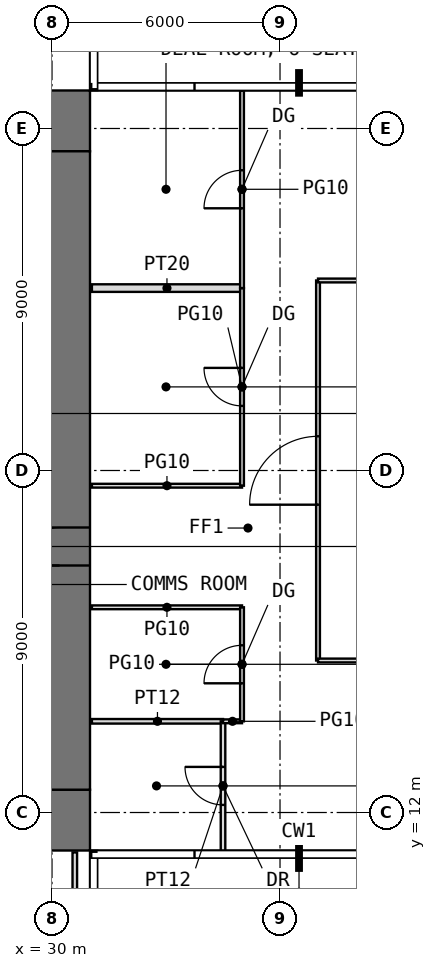
"""IFC4 building model, lengths in metres.
Left out: names, types, materials, properties, quantities, classifications, styles, units other than length and angle.
Written with IfcOpenShell. Run it as: python <this file> out.ifc"""

import sys

from ifc_helpers import new_model, si_unit, direction, frame, frame_2d, origin, place, context, subcontext, project, spatial, rectangle, extrude, element, fill, save


model = new_model("IFC4")
c1 = context("Model", 3, precision=1e-05, world=origin(), true_north=direction((0.0, 1.0)))
c2 = subcontext(c1, "Body", "Model", "MODEL_VIEW")
j1 = project(units=[si_unit("LENGTHUNIT", "METRE"), si_unit("PLANEANGLEUNIT", "RADIAN")], contexts=[c1])
p1 = place(None, origin())
s1 = spatial("IfcSite", under=j1, at=p1, CompositionType="ELEMENT")
p2 = place(p1, origin())
s2 = spatial("IfcBuilding", under=s1, at=p2, CompositionType="ELEMENT")
p3 = place(p2, frame((0.0, 0.0, 120.5)))
s3 = spatial("IfcBuildingStorey", under=s2, at=p3, CompositionType="ELEMENT", Elevation=120.5)
p4 = place(p3, frame((11.0, 11.8, -0.05), z_axis=(0.0, 0.0, 1.0), x_axis=(1.0, 0.0, 0.0)))
e1 = element("IfcWall", 1, at=p4, inside=s3, PredefinedType="SHEAR", context=c2, shape_type="SweptSolid", body=[
    extrude(rectangle(XDim=20.0, YDim=1.6, at=frame_2d((10.0, 0.0))), origin(), (0.0, 0.0, 1.0), 4.0),
])
p5 = place(p4, frame((9.0, 0.0, 0.05)))
e2 = element("IfcOpeningElement", 2, at=p5, cuts=e1, PredefinedType="OPENING", context=c2, shape_type="SweptSolid", body=[
    extrude(rectangle(XDim=2.0, YDim=2.2, at=frame_2d((1.0, 1.1))), frame((0.0, 0.81, 0.0), z_axis=(0.0, -1.0, 0.0), x_axis=(1.0, 0.0, 0.0)), (0.0, 0.0, 1.0), 1.62),
])
p6 = place(p3, frame((11.0, 30.2, -0.05), z_axis=(0.0, 0.0, 1.0), x_axis=(1.0, 0.0, 0.0)))
e3 = element("IfcWall", 3, at=p6, inside=s3, PredefinedType="SHEAR", context=c2, shape_type="SweptSolid", body=[
    extrude(rectangle(XDim=20.0, YDim=1.6, at=frame_2d((10.0, 0.0))), origin(), (0.0, 0.0, 1.0), 4.0),
])
p7 = place(p6, frame((9.0, 0.0, 0.05)))
e4 = element("IfcOpeningElement", 4, at=p7, cuts=e3, PredefinedType="OPENING", context=c2, shape_type="SweptSolid", body=[
    extrude(rectangle(XDim=2.0, YDim=2.2, at=frame_2d((1.0, 1.1))), frame((0.0, 0.81, 0.0), z_axis=(0.0, -1.0, 0.0), x_axis=(1.0, 0.0, 0.0)), (0.0, 0.0, 1.0), 1.62),
])
p8 = place(p3, frame((30.2, 12.6, -0.05), z_axis=(0.0, 0.0, 1.0), x_axis=(0.0, 1.0, 0.0)))
e5 = element("IfcWall", 5, at=p8, inside=s3, PredefinedType="SHEAR", context=c2, shape_type="SweptSolid", body=[
    extrude(rectangle(XDim=16.8, YDim=1.6, at=frame_2d((8.4, 0.0))), origin(), (0.0, 0.0, 1.0), 4.0),
])
p9 = place(p8, frame((5.9, 0.0, 0.05)))
e6 = element("IfcOpeningElement", 6, at=p9, cuts=e5, PredefinedType="OPENING", context=c2, shape_type="SweptSolid", body=[
    extrude(rectangle(XDim=1.0, YDim=2.2, at=frame_2d((0.5, 1.1))), frame((0.0, 0.81, 0.0), z_axis=(0.0, -1.0, 0.0), x_axis=(1.0, 0.0, 0.0)), (0.0, 0.0, 1.0), 1.62),
])
for number, where, z_axis, x_axis in (
    (7, (30.6, 7.5, 0.0), (0.0, 0.0, 1.0), (0.0, 1.0, 0.0)),
    (8, (31.05, 14.4, 0.0), (0.0, 0.0, 1.0), (1.0, 0.0, 0.0)),
):
    element("IfcWall", number, at=place(p3, frame(where, z_axis=z_axis, x_axis=x_axis)), inside=s3, PredefinedType="PARTITIONING", context=c2, shape_type="SweptSolid", body=[
        extrude(rectangle(XDim=3.45, YDim=0.12, at=frame_2d((1.725, 0.0))), origin(), (0.0, 0.0, 1.0), 3.75),
    ])
for number, where, z_axis, x_axis in (
    (9, (31.05, 17.4, 0.0), (0.0, 0.0, 1.0), (1.0, 0.0, 0.0)),
    (10, (31.05, 20.6, 0.0), (0.0, 0.0, 1.0), (1.0, 0.0, 0.0)),
):
    element("IfcWall", number, at=place(p3, frame(where, z_axis=z_axis, x_axis=x_axis)), inside=s3, PredefinedType="PARTITIONING", context=c2, shape_type="SweptSolid", body=[
        extrude(rectangle(XDim=3.95, YDim=0.1, at=frame_2d((1.975, 0.0))), origin(), (0.0, 0.0, 1.0), 3.75),
    ])
p10 = place(p3, frame((31.05, 25.8, 0.0), z_axis=(0.0, 0.0, 1.0), x_axis=(1.0, 0.0, 0.0)))
e11 = element("IfcWall", 11, at=p10, inside=s3, PredefinedType="PARTITIONING", context=c2, shape_type="SweptSolid", body=[
    extrude(rectangle(XDim=3.95, YDim=0.2, at=frame_2d((1.975, 0.0))), origin(), (0.0, 0.0, 1.0), 3.75),
])
p11 = place(p3, frame((34.5, 11.0, 0.0), z_axis=(0.0, 0.0, 1.0), x_axis=(0.0, 1.0, 0.0)))
e12 = element("IfcWall", 12, at=p11, inside=s3, PredefinedType="PARTITIONING", context=c2, shape_type="SweptSolid", body=[
    extrude(rectangle(XDim=3.4, YDim=0.12, at=frame_2d((1.7, 0.0))), origin(), (0.0, 0.0, 1.0), 3.75),
])
p12 = place(p11, frame((1.2, 0.0, 0.0)))
e13 = element("IfcOpeningElement", 13, at=p12, cuts=e12, PredefinedType="OPENING", context=c2, shape_type="SweptSolid", body=[
    extrude(rectangle(XDim=1.0, YDim=2.2, at=frame_2d((0.5, 1.1))), frame((0.0, 0.07, 0.0), z_axis=(0.0, -1.0, 0.0), x_axis=(1.0, 0.0, 0.0)), (0.0, 0.0, 1.0), 0.14),
])
p13 = place(p3, frame((34.5, 14.4, 0.0), z_axis=(0.0, 0.0, 1.0), x_axis=(1.0, 0.0, 0.0)))
e14 = element("IfcWall", 14, at=p13, inside=s3, PredefinedType="PARTITIONING", context=c2, shape_type="SweptSolid", body=[
    extrude(rectangle(XDim=0.5, YDim=0.1, at=frame_2d((0.25, 0.0))), origin(), (0.0, 0.0, 1.0), 3.75),
])
p14 = place(p3, frame((35.0, 14.4, 0.0), z_axis=(0.0, 0.0, 1.0), x_axis=(0.0, 1.0, 0.0)))
e15 = element("IfcWall", 15, at=p14, inside=s3, PredefinedType="PARTITIONING", context=c2, shape_type="SweptSolid", body=[
    extrude(rectangle(XDim=3.0, YDim=0.1, at=frame_2d((1.5, 0.0))), origin(), (0.0, 0.0, 1.0), 3.75),
])
p15 = place(p14, frame((1.0, 0.0, 0.0)))
e16 = element("IfcOpeningElement", 16, at=p15, cuts=e15, PredefinedType="OPENING", context=c2, shape_type="SweptSolid", body=[
    extrude(rectangle(XDim=1.0, YDim=2.4, at=frame_2d((0.5, 1.2))), frame((0.0, 0.06, 0.0), z_axis=(0.0, -1.0, 0.0), x_axis=(1.0, 0.0, 0.0)), (0.0, 0.0, 1.0), 0.12),
])
p16 = place(p3, frame((35.0, 20.6, 0.0), z_axis=(0.0, 0.0, 1.0), x_axis=(0.0, 1.0, 0.0)))
e17 = element("IfcWall", 17, at=p16, inside=s3, PredefinedType="PARTITIONING", context=c2, shape_type="SweptSolid", body=[
    extrude(rectangle(XDim=5.2, YDim=0.1, at=frame_2d((2.6, 0.0))), origin(), (0.0, 0.0, 1.0), 3.75),
])
p17 = place(p16, frame((2.1, 0.0, 0.0)))
e18 = element("IfcOpeningElement", 18, at=p17, cuts=e17, PredefinedType="OPENING", context=c2, shape_type="SweptSolid", body=[
    extrude(rectangle(XDim=1.0, YDim=2.4, at=frame_2d((0.5, 1.2))), frame((0.0, 0.06, 0.0), z_axis=(0.0, -1.0, 0.0), x_axis=(1.0, 0.0, 0.0)), (0.0, 0.0, 1.0), 0.12),
])
p18 = place(p3, frame((35.0, 25.8, 0.0), z_axis=(0.0, 0.0, 1.0), x_axis=(0.0, 1.0, 0.0)))
e19 = element("IfcWall", 19, at=p18, inside=s3, PredefinedType="PARTITIONING", context=c2, shape_type="SweptSolid", body=[
    extrude(rectangle(XDim=5.2, YDim=0.1, at=frame_2d((2.6, 0.0))), origin(), (0.0, 0.0, 1.0), 3.75),
])
p19 = place(p18, frame((2.1, 0.0, 0.0)))
e20 = element("IfcOpeningElement", 20, at=p19, cuts=e19, PredefinedType="OPENING", context=c2, shape_type="SweptSolid", body=[
    extrude(rectangle(XDim=1.0, YDim=2.4, at=frame_2d((0.5, 1.2))), frame((0.0, 0.06, 0.0), z_axis=(0.0, -1.0, 0.0), x_axis=(1.0, 0.0, 0.0)), (0.0, 0.0, 1.0), 0.12),
])
p20 = place(p3, frame((37.0, 16.0, 0.0), z_axis=(0.0, 0.0, 1.0), x_axis=(0.0, 1.0, 0.0)))
e21 = element("IfcWall", 21, at=p20, inside=s3, PredefinedType="PARTITIONING", context=c2, shape_type="SweptSolid", body=[
    extrude(rectangle(XDim=10.0, YDim=0.1, at=frame_2d((5.0, 0.0))), origin(), (0.0, 0.0, 1.0), 3.75),
])
p21 = place(p20, frame((4.1, 0.0, 0.0)))
e22 = element("IfcOpeningElement", 22, at=p21, cuts=e21, PredefinedType="OPENING", context=c2, shape_type="SweptSolid", body=[
    extrude(rectangle(XDim=1.8, YDim=2.4, at=frame_2d((0.9, 1.2))), frame((0.0, 0.06, 0.0), z_axis=(0.0, -1.0, 0.0), x_axis=(1.0, 0.0, 0.0)), (0.0, 0.0, 1.0), 0.12),
])
for number, where, z_axis, x_axis in (
    (23, (37.0, 16.0, 0.0), (0.0, 0.0, 1.0), (1.0, 0.0, 0.0)),
    (24, (37.0, 26.0, 0.0), (0.0, 0.0, 1.0), (1.0, 0.0, 0.0)),
):
    element("IfcWall", number, at=place(p3, frame(where, z_axis=z_axis, x_axis=x_axis)), inside=s3, PredefinedType="PARTITIONING", context=c2, shape_type="SweptSolid", body=[
        extrude(rectangle(XDim=3.69, YDim=0.1, at=frame_2d((1.845, 0.0))), origin(), (0.0, 0.0, 1.0), 3.75),
    ])
p22 = place(p9, origin())
e25 = element("IfcDoor", 25, at=p22, inside=s3, OperationType="SINGLE_SWING_LEFT", PredefinedType="DOOR", context=c2, shape_type="SweptSolid", body=[
    extrude(rectangle(XDim=1.0, YDim=2.2, at=frame_2d((0.5, 1.1))), frame((0.0, 0.025, 0.0), z_axis=(0.0, -1.0, 0.0), x_axis=(1.0, 0.0, 0.0)), (0.0, 0.0, 1.0), 0.05),
])
fill(e6, e25)
p23 = place(p12, origin())
e26 = element("IfcDoor", 26, at=p23, inside=s3, OperationType="SINGLE_SWING_RIGHT", PredefinedType="DOOR", context=c2, shape_type="SweptSolid", body=[
    extrude(rectangle(XDim=1.0, YDim=2.2, at=frame_2d((0.5, 1.1))), frame((0.0, 0.025, 0.0), z_axis=(0.0, -1.0, 0.0), x_axis=(1.0, 0.0, 0.0)), (0.0, 0.0, 1.0), 0.05),
])
fill(e13, e26)
p24 = place(p15, origin())
e27 = element("IfcDoor", 27, at=p24, inside=s3, OperationType="SINGLE_SWING_LEFT", PredefinedType="DOOR", context=c2, shape_type="SweptSolid", body=[
    extrude(rectangle(XDim=1.0, YDim=2.4, at=frame_2d((0.5, 1.2))), frame((0.0, 0.025, 0.0), z_axis=(0.0, -1.0, 0.0), x_axis=(1.0, 0.0, 0.0)), (0.0, 0.0, 1.0), 0.05),
])
fill(e16, e27)
p25 = place(p17, origin())
e28 = element("IfcDoor", 28, at=p25, inside=s3, OperationType="SINGLE_SWING_RIGHT", PredefinedType="DOOR", context=c2, shape_type="SweptSolid", body=[
    extrude(rectangle(XDim=1.0, YDim=2.4, at=frame_2d((0.5, 1.2))), frame((0.0, 0.025, 0.0), z_axis=(0.0, -1.0, 0.0), x_axis=(1.0, 0.0, 0.0)), (0.0, 0.0, 1.0), 0.05),
])
fill(e18, e28)
p26 = place(p19, origin())
e29 = element("IfcDoor", 29, at=p26, inside=s3, OperationType="SINGLE_SWING_LEFT", PredefinedType="DOOR", context=c2, shape_type="SweptSolid", body=[
    extrude(rectangle(XDim=1.0, YDim=2.4, at=frame_2d((0.5, 1.2))), frame((0.0, 0.025, 0.0), z_axis=(0.0, -1.0, 0.0), x_axis=(1.0, 0.0, 0.0)), (0.0, 0.0, 1.0), 0.05),
])
fill(e20, e29)
p27 = place(p21, origin())
e30 = element("IfcDoor", 30, at=p27, inside=s3, OperationType="DOUBLE_DOOR_SINGLE_SWING", PredefinedType="DOOR", context=c2, shape_type="SweptSolid", body=[
    extrude(rectangle(XDim=1.8, YDim=2.4, at=frame_2d((0.9, 1.2))), frame((0.0, 0.025, 0.0), z_axis=(0.0, -1.0, 0.0), x_axis=(1.0, 0.0, 0.0)), (0.0, 0.0, 1.0), 0.05),
])
fill(e22, e30)
save(model, sys.argv[1])
